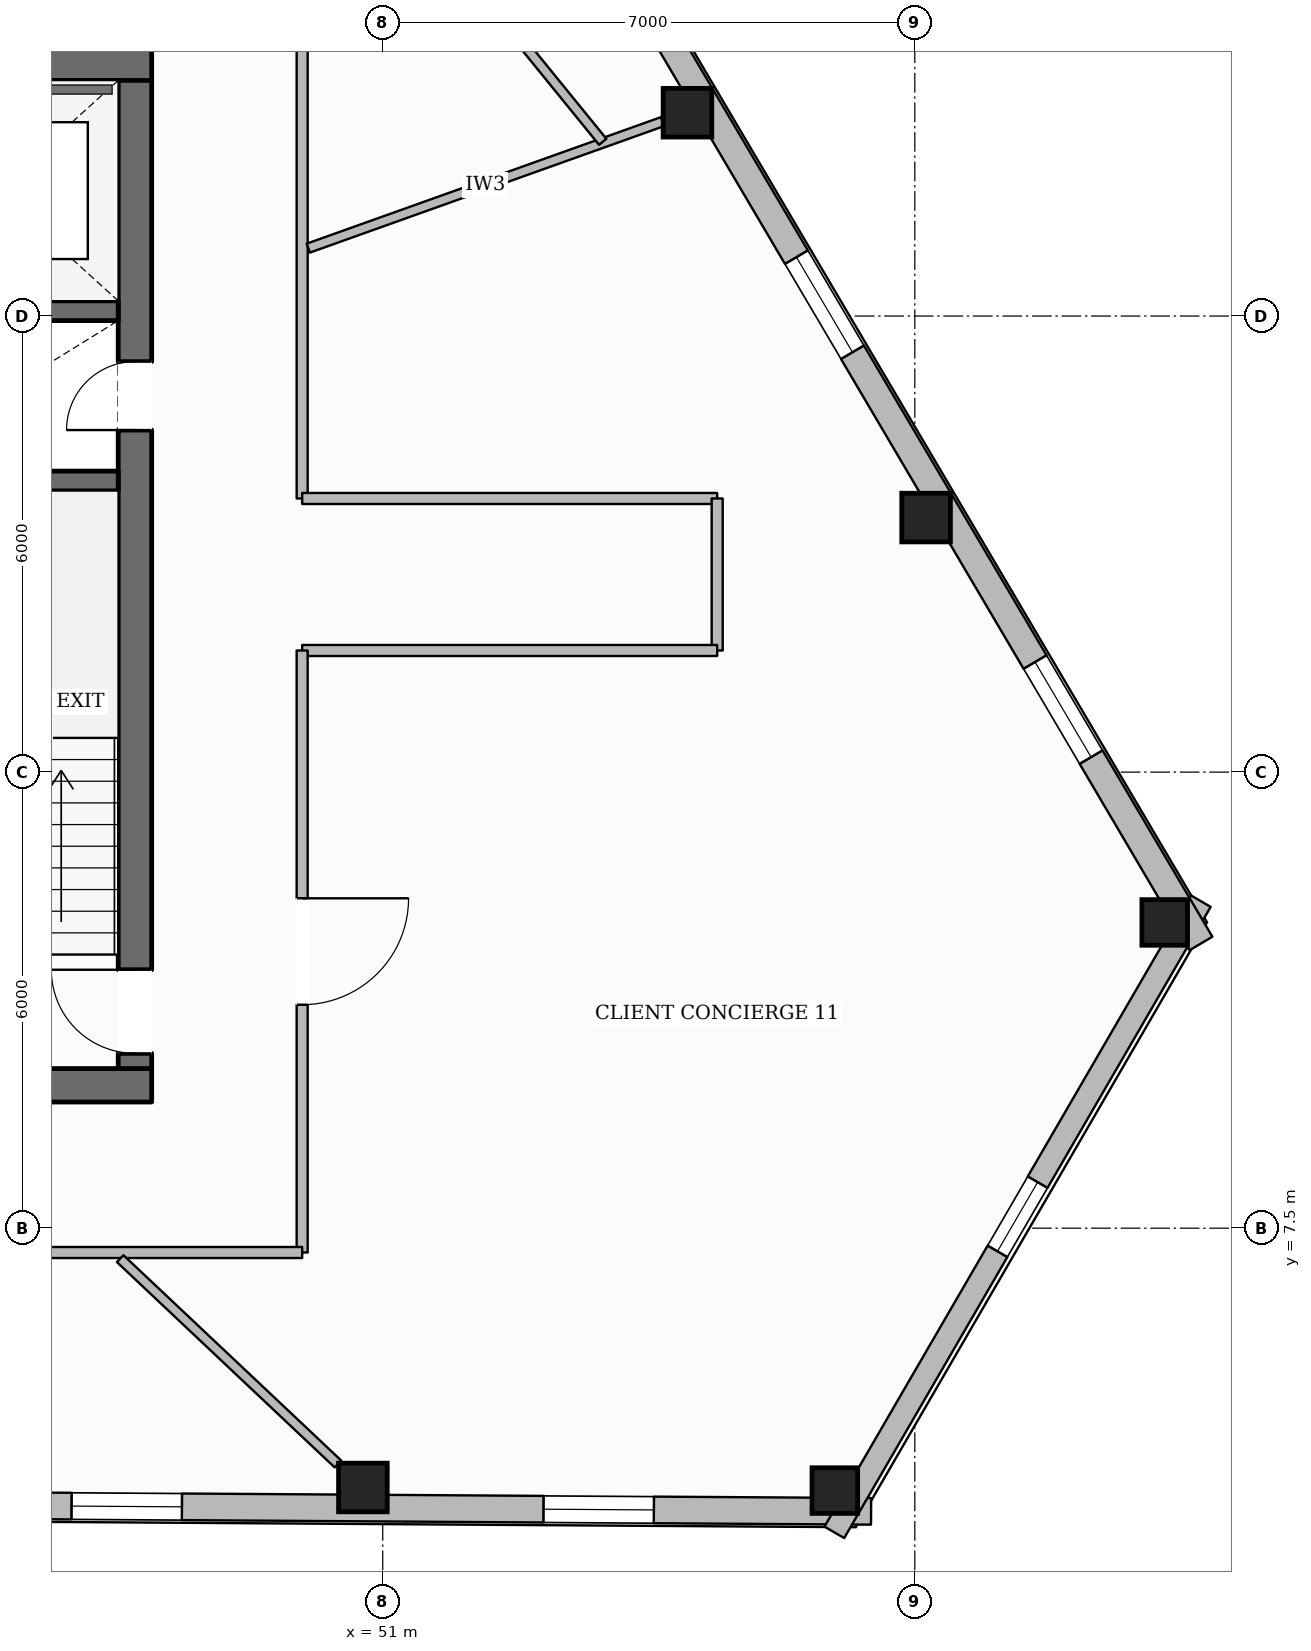
"""IFC4 building model, lengths in metres.
Left out: names, types, materials, properties, quantities, classifications, styles, units other than length and angle.
Written with IfcOpenShell. Run it as: python <this file> out.ifc"""

import sys

from ifc_helpers import new_model, si_unit, direction, frame, frame_2d, origin, origin_2d, place, context, subcontext, project, spatial, rectangle, hollow_rectangle, extrude, element, fill, save


model = new_model("IFC4")
c1 = context("Model", 3, precision=1e-05, world=origin(), true_north=direction((0.0, 1.0)))
c2 = subcontext(c1, "Body", "Model", "MODEL_VIEW")
j1 = project(units=[si_unit("LENGTHUNIT", "METRE"), si_unit("PLANEANGLEUNIT", "RADIAN")], contexts=[c1])
p1 = place(None, origin())
s1 = spatial("IfcSite", under=j1, at=p1, CompositionType="ELEMENT")
p2 = place(p1, origin())
s2 = spatial("IfcBuilding", under=s1, at=p2, CompositionType="ELEMENT")
p3 = place(p2, frame((0.0, 0.0, 195.8)))
s3 = spatial("IfcBuildingStorey", under=s2, at=p3, CompositionType="ELEMENT", Elevation=195.8)
p4 = place(p3, frame((28.04, 9.38, 0.0), z_axis=(0.0, 0.0, 1.0), x_axis=(1.0, 0.0, 0.0)))
e1 = element("IfcWall", 1, at=p4, inside=s3, PredefinedType="SOLIDWALL", context=c2, shape_type="SweptSolid", body=[
    extrude(rectangle(XDim=19.92, YDim=0.44, at=frame_2d((9.96, 0.0))), origin(), (0.0, 0.0, 1.0), 3.6),
])
p5 = place(p4, frame((10.46, 0.0, 0.0)))
e2 = element("IfcOpeningElement", 2, at=p5, cuts=e1, PredefinedType="OPENING", context=c2, shape_type="SweptSolid", body=[
    extrude(rectangle(XDim=1.4, YDim=2.2, at=frame_2d((0.7, 1.1))), frame((0.0, 0.23, 0.0), z_axis=(0.0, -1.0, 0.0), x_axis=(1.0, 0.0, 0.0)), (0.0, 0.0, 1.0), 0.46),
])
p6 = place(p3, frame((28.04, 22.82, 0.0), z_axis=(0.0, 0.0, 1.0), x_axis=(1.0, 0.0, 0.0)))
e3 = element("IfcWall", 3, at=p6, inside=s3, PredefinedType="SOLIDWALL", context=c2, shape_type="SweptSolid", body=[
    extrude(rectangle(XDim=19.92, YDim=0.44, at=frame_2d((9.96, 0.0))), origin(), (0.0, 0.0, 1.0), 3.6),
])
p7 = place(p6, frame((6.235, 0.0, 0.0)))
e4 = element("IfcOpeningElement", 4, at=p7, cuts=e3, PredefinedType="OPENING", context=c2, shape_type="SweptSolid", body=[
    extrude(rectangle(XDim=1.05, YDim=2.15, at=frame_2d((0.525, 1.075))), frame((0.0, 0.23, 0.0), z_axis=(0.0, -1.0, 0.0), x_axis=(1.0, 0.0, 0.0)), (0.0, 0.0, 1.0), 0.46),
])
p8 = place(p6, frame((12.635, 0.0, 0.0)))
e5 = element("IfcOpeningElement", 5, at=p8, cuts=e3, PredefinedType="OPENING", context=c2, shape_type="SweptSolid", body=[
    extrude(rectangle(XDim=1.05, YDim=2.15, at=frame_2d((0.525, 1.075))), frame((0.0, 0.23, 0.0), z_axis=(0.0, -1.0, 0.0), x_axis=(1.0, 0.0, 0.0)), (0.0, 0.0, 1.0), 0.46),
])
p9 = place(p3, frame((47.74, 9.6, 0.0), z_axis=(0.0, 0.0, 1.0), x_axis=(0.0, 1.0, 0.0)))
e6 = element("IfcWall", 6, at=p9, inside=s3, PredefinedType="SOLIDWALL", context=c2, shape_type="SweptSolid", body=[
    extrude(rectangle(XDim=13.0, YDim=0.44, at=frame_2d((6.5, 0.0))), origin(), (0.0, 0.0, 1.0), 3.6),
])
p10 = place(p9, frame((0.2, 0.0, 0.0)))
e7 = element("IfcOpeningElement", 7, at=p10, cuts=e6, PredefinedType="OPENING", context=c2, shape_type="SweptSolid", body=[
    extrude(rectangle(XDim=1.1, YDim=2.15, at=frame_2d((0.55, 1.075))), frame((0.0, 0.23, 0.0), z_axis=(0.0, -1.0, 0.0), x_axis=(1.0, 0.0, 0.0)), (0.0, 0.0, 1.0), 0.46),
])
p11 = place(p9, frame((8.4, 0.0, 0.0)))
e8 = element("IfcOpeningElement", 8, at=p11, cuts=e6, PredefinedType="OPENING", context=c2, shape_type="SweptSolid", body=[
    extrude(rectangle(XDim=0.9, YDim=2.1, at=frame_2d((0.45, 1.05))), frame((0.0, 0.23, 0.0), z_axis=(0.0, -1.0, 0.0), x_axis=(1.0, 0.0, 0.0)), (0.0, 0.0, 1.0), 0.46),
])
for number, where, z_axis, x_axis in (
    (9, (44.32, 17.33, 0.0), (0.0, 0.0, 1.0), (1.0, 0.0, 0.0)),
    (10, (44.32, 19.57, 0.0), (0.0, 0.0, 1.0), (1.0, 0.0, 0.0)),
):
    element("IfcWall", number, at=place(p3, frame(where, z_axis=z_axis, x_axis=x_axis)), inside=s3, PredefinedType="SHEAR", context=c2, shape_type="SweptSolid", body=[
        extrude(rectangle(XDim=3.2, YDim=0.26, at=frame_2d((1.6, 0.0))), origin(), (0.0, 0.0, 1.0), 3.6),
    ])
p12 = place(p3, frame((50.739, 4.088, 0.0), z_axis=(0.0, 0.0, 1.0), x_axis=(1.0, 0.0, 0.0)))
e11 = element("IfcColumn", 11, at=p12, inside=s3, PredefinedType="COLUMN", context=c2, shape_type="SweptSolid", body=[
    extrude(hollow_rectangle(XDim=0.64, YDim=0.64, WallThickness=0.028, at=origin_2d()), origin(), (0.0, 0.0, 1.0), 3.6),
])
for number, where, z_axis, x_axis in (
    (12, (56.948, 4.048, 0.0), (0.0, 0.0, 1.0), (1.0, 0.0, 0.0)),
    (13, (61.288, 11.522, 0.0), (0.0, 0.0, 1.0), (1.0, 0.0, 0.0)),
):
    element("IfcColumn", number, at=place(p3, frame(where, z_axis=z_axis, x_axis=x_axis)), inside=s3, PredefinedType="COLUMN", context=c2, shape_type="SweptSolid", body=[
        extrude(hollow_rectangle(XDim=0.6, YDim=0.6, WallThickness=0.028, at=origin_2d()), origin(), (0.0, 0.0, 1.0), 3.6),
    ])
for number, where, z_axis, x_axis in (
    (14, (58.148, 16.849, 0.0), (0.0, 0.0, 1.0), (1.0, 0.0, 0.0)),
    (15, (55.009, 22.175, 0.0), (0.0, 0.0, 1.0), (1.0, 0.0, 0.0)),
):
    element("IfcColumn", number, at=place(p3, frame(where, z_axis=z_axis, x_axis=x_axis)), inside=s3, PredefinedType="COLUMN", context=c2, shape_type="SweptSolid", body=[
        extrude(hollow_rectangle(XDim=0.64, YDim=0.64, WallThickness=0.028, at=origin_2d()), origin(), (0.0, 0.0, 1.0), 3.6),
    ])
p13 = place(p3, frame((57.425, 3.775, 0.0), z_axis=(0.0, 0.0, 1.0), x_axis=(-0.99997846495, 0.006562746083, 0.0)))
e16 = element("IfcWall", 16, at=p13, inside=s3, PredefinedType="STANDARD", context=c2, shape_type="SweptSolid", body=[
    extrude(rectangle(XDim=38.205, YDim=0.35, at=frame_2d((19.103, 0.0))), origin(), (0.0, 0.0, 1.0), 3.132),
])
p14 = place(p13, frame((33.904, 0.0, 0.65)))
e17 = element("IfcOpeningElement", 17, at=p14, cuts=e16, PredefinedType="OPENING", context=c2, shape_type="SweptSolid", body=[
    extrude(rectangle(XDim=1.45, YDim=1.75, at=frame_2d((0.725, 0.875))), frame((0.0, 0.185, 0.0), z_axis=(0.0, -1.0, 0.0), x_axis=(1.0, 0.0, 0.0)), (0.0, 0.0, 1.0), 0.37),
])
p15 = place(p13, frame((27.695, 0.0, 0.65)))
e18 = element("IfcOpeningElement", 18, at=p15, cuts=e16, PredefinedType="OPENING", context=c2, shape_type="SweptSolid", body=[
    extrude(rectangle(XDim=1.45, YDim=1.75, at=frame_2d((0.725, 0.875))), frame((0.0, 0.185, 0.0), z_axis=(0.0, -1.0, 0.0), x_axis=(1.0, 0.0, 0.0)), (0.0, 0.0, 1.0), 0.37),
])
p16 = place(p13, frame((15.276, 0.0, 0.65)))
e19 = element("IfcOpeningElement", 19, at=p16, cuts=e16, PredefinedType="OPENING", context=c2, shape_type="SweptSolid", body=[
    extrude(rectangle(XDim=1.45, YDim=1.75, at=frame_2d((0.725, 0.875))), frame((0.0, 0.185, 0.0), z_axis=(0.0, -1.0, 0.0), x_axis=(1.0, 0.0, 0.0)), (0.0, 0.0, 1.0), 0.37),
])
p17 = place(p13, frame((9.067, 0.0, 0.65)))
e20 = element("IfcOpeningElement", 20, at=p17, cuts=e16, PredefinedType="OPENING", context=c2, shape_type="SweptSolid", body=[
    extrude(rectangle(XDim=1.45, YDim=1.75, at=frame_2d((0.725, 0.875))), frame((0.0, 0.185, 0.0), z_axis=(0.0, -1.0, 0.0), x_axis=(1.0, 0.0, 0.0)), (0.0, 0.0, 1.0), 0.37),
])
p18 = place(p13, frame((2.858, 0.0, 0.65)))
e21 = element("IfcOpeningElement", 21, at=p18, cuts=e16, PredefinedType="OPENING", context=c2, shape_type="SweptSolid", body=[
    extrude(rectangle(XDim=1.45, YDim=1.75, at=frame_2d((0.725, 0.875))), frame((0.0, 0.185, 0.0), z_axis=(0.0, -1.0, 0.0), x_axis=(1.0, 0.0, 0.0)), (0.0, 0.0, 1.0), 0.37),
])
p19 = place(p3, frame((61.763, 11.802, 0.0), z_axis=(0.0, 0.0, 1.0), x_axis=(-0.502107301485, -0.864805329421, 0.0)))
e22 = element("IfcWall", 22, at=p19, inside=s3, PredefinedType="STANDARD", context=c2, shape_type="SweptSolid", body=[
    extrude(rectangle(XDim=9.602, YDim=0.3, at=frame_2d((4.801, 0.0))), origin(), (0.0, 0.0, 1.0), 3.132),
])
p20 = place(p19, frame((4.276, 0.0, 0.65)))
e23 = element("IfcOpeningElement", 23, at=p20, cuts=e22, PredefinedType="OPENING", context=c2, shape_type="SweptSolid", body=[
    extrude(rectangle(XDim=1.05, YDim=1.7, at=frame_2d((0.525, 0.85))), frame((0.0, 0.16, 0.0), z_axis=(0.0, -1.0, 0.0), x_axis=(1.0, 0.0, 0.0)), (0.0, 0.0, 1.0), 0.32),
])
p21 = place(p3, frame((42.444, 44.024, 0.0), z_axis=(0.0, 0.0, 1.0), x_axis=(0.507770038723, -0.861492651028, 0.0)))
e24 = element("IfcWall", 24, at=p21, inside=s3, PredefinedType="STANDARD", context=c2, shape_type="SweptSolid", body=[
    extrude(rectangle(XDim=38.049, YDim=0.35, at=frame_2d((19.024, 0.0))), origin(), (0.0, 0.0, 1.0), 3.132),
])
p22 = place(p21, frame((33.752, 0.0, 0.65)))
e25 = element("IfcOpeningElement", 25, at=p22, cuts=e24, PredefinedType="OPENING", context=c2, shape_type="SweptSolid", body=[
    extrude(rectangle(XDim=1.45, YDim=1.75, at=frame_2d((0.725, 0.875))), frame((0.0, 0.185, 0.0), z_axis=(0.0, -1.0, 0.0), x_axis=(1.0, 0.0, 0.0)), (0.0, 0.0, 1.0), 0.37),
])
p23 = place(p21, frame((27.569, 0.0, 0.65)))
e26 = element("IfcOpeningElement", 26, at=p23, cuts=e24, PredefinedType="OPENING", context=c2, shape_type="SweptSolid", body=[
    extrude(rectangle(XDim=1.45, YDim=1.75, at=frame_2d((0.725, 0.875))), frame((0.0, 0.185, 0.0), z_axis=(0.0, -1.0, 0.0), x_axis=(1.0, 0.0, 0.0)), (0.0, 0.0, 1.0), 0.37),
])
p24 = place(p21, frame((15.204, 0.0, 0.65)))
e27 = element("IfcOpeningElement", 27, at=p24, cuts=e24, PredefinedType="OPENING", context=c2, shape_type="SweptSolid", body=[
    extrude(rectangle(XDim=1.45, YDim=1.75, at=frame_2d((0.725, 0.875))), frame((0.0, 0.185, 0.0), z_axis=(0.0, -1.0, 0.0), x_axis=(1.0, 0.0, 0.0)), (0.0, 0.0, 1.0), 0.37),
])
p25 = place(p21, frame((9.021, 0.0, 0.65)))
e28 = element("IfcOpeningElement", 28, at=p25, cuts=e24, PredefinedType="OPENING", context=c2, shape_type="SweptSolid", body=[
    extrude(rectangle(XDim=1.45, YDim=1.75, at=frame_2d((0.725, 0.875))), frame((0.0, 0.185, 0.0), z_axis=(0.0, -1.0, 0.0), x_axis=(1.0, 0.0, 0.0)), (0.0, 0.0, 1.0), 0.37),
])
p26 = place(p21, frame((2.839, 0.0, 0.65)))
e29 = element("IfcOpeningElement", 29, at=p26, cuts=e24, PredefinedType="OPENING", context=c2, shape_type="SweptSolid", body=[
    extrude(rectangle(XDim=1.45, YDim=1.75, at=frame_2d((0.725, 0.875))), frame((0.0, 0.185, 0.0), z_axis=(0.0, -1.0, 0.0), x_axis=(1.0, 0.0, 0.0)), (0.0, 0.0, 1.0), 0.37),
])
p27 = place(p3, frame((49.94, 25.02, 0.0), z_axis=(0.0, 0.0, 1.0), x_axis=(0.0, -1.0, 0.0)))
e30 = element("IfcWall", 30, at=p27, inside=s3, PredefinedType="PARTITIONING", context=c2, shape_type="SweptSolid", body=[
    extrude(rectangle(XDim=7.92, YDim=0.145, at=frame_2d((3.96, 0.0))), origin(), (0.0, 0.0, 1.0), 3.339),
])
p28 = place(p3, frame((49.94, 17.1, 0.0), z_axis=(0.0, 0.0, 1.0), x_axis=(1.0, 0.0, 0.0)))
e31 = element("IfcWall", 31, at=p28, inside=s3, PredefinedType="PARTITIONING", context=c2, shape_type="SweptSolid", body=[
    extrude(rectangle(XDim=5.46, YDim=0.145, at=frame_2d((2.73, 0.0))), origin(), (0.0, 0.0, 1.0), 3.6),
])
p29 = place(p3, frame((55.4, 17.1, 0.0), z_axis=(0.0, 0.0, 1.0), x_axis=(0.0, -1.0, 0.0)))
e32 = element("IfcWall", 32, at=p29, inside=s3, PredefinedType="PARTITIONING", context=c2, shape_type="SweptSolid", body=[
    extrude(rectangle(XDim=2.0, YDim=0.145, at=frame_2d((1.0, 0.0))), origin(), (0.0, 0.0, 1.0), 3.339),
])
p30 = place(p3, frame((55.4, 15.1, 0.0), z_axis=(0.0, 0.0, 1.0), x_axis=(-1.0, 0.0, 0.0)))
e33 = element("IfcWall", 33, at=p30, inside=s3, PredefinedType="PARTITIONING", context=c2, shape_type="SweptSolid", body=[
    extrude(rectangle(XDim=5.46, YDim=0.145, at=frame_2d((2.73, 0.0))), origin(), (0.0, 0.0, 1.0), 3.6),
])
p31 = place(p3, frame((49.94, 15.1, 0.0), z_axis=(0.0, 0.0, 1.0), x_axis=(0.0, -1.0, 0.0)))
e34 = element("IfcWall", 34, at=p31, inside=s3, PredefinedType="PARTITIONING", context=c2, shape_type="SweptSolid", body=[
    extrude(rectangle(XDim=7.92, YDim=0.145, at=frame_2d((3.96, 0.0))), origin(), (0.0, 0.0, 1.0), 3.6),
])
p32 = place(p31, frame((3.26, 0.0, 0.0)))
e35 = element("IfcOpeningElement", 35, at=p32, cuts=e34, PredefinedType="OPENING", context=c2, shape_type="SweptSolid", body=[
    extrude(rectangle(XDim=1.4, YDim=2.2, at=frame_2d((0.7, 1.1))), frame((0.0, 0.083, 0.0), z_axis=(0.0, -1.0, 0.0), x_axis=(1.0, 0.0, 0.0)), (0.0, 0.0, 1.0), 0.165),
])
p33 = place(p3, frame((49.94, 7.18, 0.0), z_axis=(0.0, 0.0, 1.0), x_axis=(-1.0, 0.0, 0.0)))
e36 = element("IfcWall", 36, at=p33, inside=s3, PredefinedType="PARTITIONING", context=c2, shape_type="SweptSolid", body=[
    extrude(rectangle(XDim=23.88, YDim=0.145, at=frame_2d((11.94, 0.0))), origin(), (0.0, 0.0, 1.0), 3.6),
])
p34 = place(p33, frame((19.749, 0.0, 0.0)))
e37 = element("IfcOpeningElement", 37, at=p34, cuts=e36, PredefinedType="OPENING", context=c2, shape_type="SweptSolid", body=[
    extrude(rectangle(XDim=0.98, YDim=2.15, at=frame_2d((0.49, 1.075))), frame((0.0, 0.083, 0.0), z_axis=(0.0, -1.0, 0.0), x_axis=(1.0, 0.0, 0.0)), (0.0, 0.0, 1.0), 0.165),
])
p35 = place(p33, frame((8.929, 0.0, 0.0)))
e38 = element("IfcOpeningElement", 38, at=p35, cuts=e36, PredefinedType="OPENING", context=c2, shape_type="SweptSolid", body=[
    extrude(rectangle(XDim=1.02, YDim=2.15, at=frame_2d((0.51, 1.075))), frame((0.0, 0.083, 0.0), z_axis=(0.0, -1.0, 0.0), x_axis=(1.0, 0.0, 0.0)), (0.0, 0.0, 1.0), 0.165),
])
p36 = place(p3, frame((50.021, 20.393, 0.0), z_axis=(0.0, 0.0, 1.0), x_axis=(0.941734098286, 0.336358273462, 0.0)))
e39 = element("IfcWall", 39, at=p36, inside=s3, PredefinedType="PARTITIONING", context=c2, shape_type="SweptSolid", body=[
    extrude(rectangle(XDim=4.949, YDim=0.125, at=frame_2d((2.474, 0.0))), origin(), (0.0, 0.0, 1.0), 3.6),
])
p37 = place(p3, frame((47.546, 7.1, 0.0), z_axis=(0.0, 0.0, 1.0), x_axis=(0.727539012219, -0.686066312903, 0.0)))
e40 = element("IfcWall", 40, at=p37, inside=s3, PredefinedType="PARTITIONING", context=c2, shape_type="SweptSolid", body=[
    extrude(rectangle(XDim=3.938, YDim=0.125, at=frame_2d((1.969, 0.0))), origin(), (0.0, 0.0, 1.0), 3.6),
])
p38 = place(p3, frame((53.894, 21.793, 0.0), z_axis=(0.0, 0.0, 1.0), x_axis=(-0.630861507456, 0.775895455851, 0.0)))
e41 = element("IfcWall", 41, at=p38, inside=s3, PredefinedType="PARTITIONING", context=c2, shape_type="SweptSolid", body=[
    extrude(rectangle(XDim=10.8, YDim=0.125, at=frame_2d((5.4, 0.0))), origin(), (0.0, 0.0, 1.0), 3.339),
])
p39 = place(p38, frame((4.88, 0.0, 0.0)))
e42 = element("IfcOpeningElement", 42, at=p39, cuts=e41, PredefinedType="OPENING", context=c2, shape_type="SweptSolid", body=[
    extrude(rectangle(XDim=1.02, YDim=2.15, at=frame_2d((0.51, 1.075))), frame((0.0, 0.073, 0.0), z_axis=(0.0, -1.0, 0.0), x_axis=(1.0, 0.0, 0.0)), (0.0, 0.0, 1.0), 0.145),
])
p40 = place(p17, origin())
e43 = element("IfcWindow", 43, at=p40, inside=s3, PartitioningType="SINGLE_PANEL", PredefinedType="WINDOW", context=c2, shape_type="SweptSolid", body=[
    extrude(rectangle(XDim=1.45, YDim=1.75, at=frame_2d((0.725, 0.875))), frame((0.0, 0.03, 0.0), z_axis=(0.0, -1.0, 0.0), x_axis=(1.0, 0.0, 0.0)), (0.0, 0.0, 1.0), 0.06),
])
fill(e20, e43)
p41 = place(p18, origin())
e44 = element("IfcWindow", 44, at=p41, inside=s3, PartitioningType="SINGLE_PANEL", PredefinedType="WINDOW", context=c2, shape_type="SweptSolid", body=[
    extrude(rectangle(XDim=1.45, YDim=1.75, at=frame_2d((0.725, 0.875))), frame((0.0, 0.03, 0.0), z_axis=(0.0, -1.0, 0.0), x_axis=(1.0, 0.0, 0.0)), (0.0, 0.0, 1.0), 0.06),
])
fill(e21, e44)
p42 = place(p22, origin())
e45 = element("IfcWindow", 45, at=p42, inside=s3, PartitioningType="SINGLE_PANEL", PredefinedType="WINDOW", context=c2, shape_type="SweptSolid", body=[
    extrude(rectangle(XDim=1.45, YDim=1.75, at=frame_2d((0.725, 0.875))), frame((0.0, 0.03, 0.0), z_axis=(0.0, -1.0, 0.0), x_axis=(1.0, 0.0, 0.0)), (0.0, 0.0, 1.0), 0.06),
])
fill(e25, e45)
p43 = place(p23, origin())
e46 = element("IfcWindow", 46, at=p43, inside=s3, PartitioningType="SINGLE_PANEL", PredefinedType="WINDOW", context=c2, shape_type="SweptSolid", body=[
    extrude(rectangle(XDim=1.45, YDim=1.75, at=frame_2d((0.725, 0.875))), frame((0.0, 0.03, 0.0), z_axis=(0.0, -1.0, 0.0), x_axis=(1.0, 0.0, 0.0)), (0.0, 0.0, 1.0), 0.06),
])
fill(e26, e46)
p44 = place(p20, origin())
e47 = element("IfcWindow", 47, at=p44, inside=s3, PartitioningType="SINGLE_PANEL", PredefinedType="WINDOW", context=c2, shape_type="SweptSolid", body=[
    extrude(rectangle(XDim=1.05, YDim=1.7, at=frame_2d((0.525, 0.85))), frame((0.0, 0.03, 0.0), z_axis=(0.0, -1.0, 0.0), x_axis=(1.0, 0.0, 0.0)), (0.0, 0.0, 1.0), 0.06),
])
fill(e23, e47)
p45 = place(p10, origin())
e48 = element("IfcDoor", 48, at=p45, inside=s3, OperationType="SINGLE_SWING_RIGHT", PredefinedType="DOOR", context=c2, shape_type="SweptSolid", body=[
    extrude(rectangle(XDim=1.1, YDim=2.15, at=frame_2d((0.55, 1.075))), frame((0.0, 0.025, 0.0), z_axis=(0.0, -1.0, 0.0), x_axis=(1.0, 0.0, 0.0)), (0.0, 0.0, 1.0), 0.05),
])
fill(e7, e48)
p46 = place(p11, origin())
e49 = element("IfcDoor", 49, at=p46, inside=s3, OperationType="SINGLE_SWING_LEFT", PredefinedType="DOOR", context=c2, shape_type="SweptSolid", body=[
    extrude(rectangle(XDim=0.9, YDim=2.1, at=frame_2d((0.45, 1.05))), frame((0.0, 0.025, 0.0), z_axis=(0.0, -1.0, 0.0), x_axis=(1.0, 0.0, 0.0)), (0.0, 0.0, 1.0), 0.05),
])
fill(e8, e49)
p47 = place(p32, origin())
e50 = element("IfcDoor", 50, at=p47, inside=s3, OperationType="SINGLE_SWING_LEFT", PredefinedType="DOOR", context=c2, shape_type="SweptSolid", body=[
    extrude(rectangle(XDim=1.4, YDim=2.2, at=frame_2d((0.7, 1.1))), frame((0.0, 0.025, 0.0), z_axis=(0.0, -1.0, 0.0), x_axis=(1.0, 0.0, 0.0)), (0.0, 0.0, 1.0), 0.05),
])
fill(e35, e50)
save(model, sys.argv[1])
